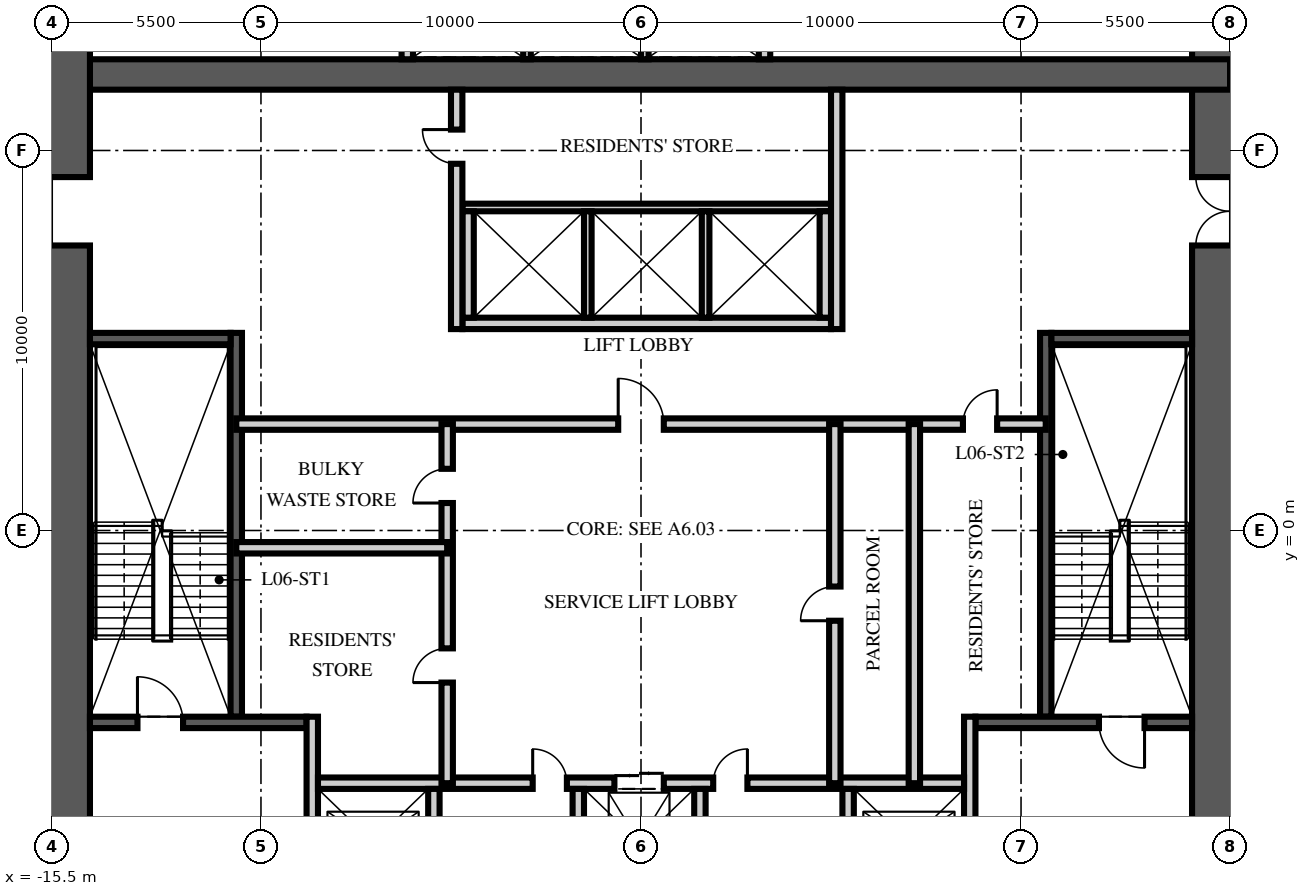
"""IFC4 building model, lengths in metres.
Left out: names, types, materials, properties, quantities, classifications, styles, units other than length and angle.
Written with IfcOpenShell. Run it as: python <this file> out.ifc"""

import sys

from ifc_helpers import new_model, si_unit, direction, frame, frame_2d, origin, place, context, subcontext, project, spatial, rectangle, extrude, element, fill, save


model = new_model("IFC4")
c1 = context("Model", 3, precision=1e-05, world=origin(), true_north=direction((0.0, 1.0)))
c2 = subcontext(c1, "Body", "Model", "MODEL_VIEW")
j1 = project(units=[si_unit("LENGTHUNIT", "METRE"), si_unit("PLANEANGLEUNIT", "RADIAN")], contexts=[c1])
p1 = place(None, origin())
s1 = spatial("IfcSite", under=j1, at=p1, CompositionType="ELEMENT")
p2 = place(p1, origin())
s2 = spatial("IfcBuilding", under=s1, at=p2, CompositionType="ELEMENT")
p3 = place(p2, frame((0.0, 0.0, 28.5)))
s3 = spatial("IfcBuildingStorey", under=s2, at=p3, CompositionType="ELEMENT", Elevation=28.5)
p4 = place(p3, frame((15.5, -15.5, -0.25), z_axis=(0.0, 0.0, 1.0), x_axis=(0.0, 1.0, 0.0)))
e1 = element("IfcWall", 1, at=p4, inside=s3, PredefinedType="SHEAR", context=c2, shape_type="SweptSolid", body=[
    extrude(rectangle(XDim=31.0, YDim=2.0, at=frame_2d((15.5, 0.0))), origin(), (0.0, 0.0, 1.0), 3.75),
])
p5 = place(p4, frame((6.5, 0.0, 0.25)))
e2 = element("IfcOpeningElement", 2, at=p5, cuts=e1, PredefinedType="OPENING", context=c2, shape_type="SweptSolid", body=[
    extrude(rectangle(XDim=1.2, YDim=2.1, at=frame_2d((0.6, 1.05))), frame((0.0, 1.01, 0.0), z_axis=(0.0, -1.0, 0.0), x_axis=(1.0, 0.0, 0.0)), (0.0, 0.0, 1.0), 2.02),
])
p6 = place(p4, frame((23.0, 0.0, 0.25)))
e3 = element("IfcOpeningElement", 3, at=p6, cuts=e1, PredefinedType="OPENING", context=c2, shape_type="SweptSolid", body=[
    extrude(rectangle(XDim=1.8, YDim=2.1, at=frame_2d((0.9, 1.05))), frame((0.0, 1.01, 0.0), z_axis=(0.0, -1.0, 0.0), x_axis=(1.0, 0.0, 0.0)), (0.0, 0.0, 1.0), 2.02),
])
p7 = place(p3, frame((-15.5, 12.0, -0.25), z_axis=(0.0, 0.0, 1.0), x_axis=(1.0, 0.0, 0.0)))
e4 = element("IfcWall", 4, at=p7, inside=s3, PredefinedType="SHEAR", context=c2, shape_type="SweptSolid", body=[
    extrude(rectangle(XDim=31.0, YDim=0.8, at=frame_2d((15.5, 0.0))), origin(), (0.0, 0.0, 1.0), 3.75),
])
p8 = place(p3, frame((-15.5, -15.5, -0.25), z_axis=(0.0, 0.0, 1.0), x_axis=(0.0, 1.0, 0.0)))
e5 = element("IfcWall", 5, at=p8, inside=s3, PredefinedType="SHEAR", context=c2, shape_type="SweptSolid", body=[
    extrude(rectangle(XDim=31.0, YDim=2.0, at=frame_2d((15.5, 0.0))), origin(), (0.0, 0.0, 1.0), 3.75),
])
p9 = place(p8, frame((6.5, 0.0, 0.25)))
e6 = element("IfcOpeningElement", 6, at=p9, cuts=e5, PredefinedType="OPENING", context=c2, shape_type="SweptSolid", body=[
    extrude(rectangle(XDim=1.2, YDim=2.1, at=frame_2d((0.6, 1.05))), frame((0.0, 1.01, 0.0), z_axis=(0.0, -1.0, 0.0), x_axis=(1.0, 0.0, 0.0)), (0.0, 0.0, 1.0), 2.02),
])
p10 = place(p8, frame((23.0, 0.0, 0.25)))
e7 = element("IfcOpeningElement", 7, at=p10, cuts=e5, PredefinedType="OPENING", context=c2, shape_type="SweptSolid", body=[
    extrude(rectangle(XDim=1.8, YDim=2.1, at=frame_2d((0.9, 1.05))), frame((0.0, 1.01, 0.0), z_axis=(0.0, -1.0, 0.0), x_axis=(1.0, 0.0, 0.0)), (0.0, 0.0, 1.0), 2.02),
])
p11 = place(p3, frame((-10.65, -4.9, 0.0), z_axis=(0.0, 0.0, 1.0), x_axis=(0.0, 1.0, 0.0)))
e8 = element("IfcWall", 8, at=p11, inside=s3, PredefinedType="SOLIDWALL", context=c2, shape_type="SweptSolid", body=[
    extrude(rectangle(XDim=10.1, YDim=0.3, at=frame_2d((5.05, 0.0))), origin(), (0.0, 0.0, 1.0), 3.5),
])
p12 = place(p3, frame((-14.5, -5.05, 0.0), z_axis=(0.0, 0.0, 1.0), x_axis=(1.0, 0.0, 0.0)))
e9 = element("IfcWall", 9, at=p12, inside=s3, PredefinedType="SOLIDWALL", context=c2, shape_type="SweptSolid", body=[
    extrude(rectangle(XDim=5.7, YDim=0.3, at=frame_2d((2.85, 0.0))), origin(), (0.0, 0.0, 1.0), 3.5),
])
p13 = place(p12, frame((1.25, 0.0, 0.0)))
e10 = element("IfcOpeningElement", 10, at=p13, cuts=e9, PredefinedType="OPENING", context=c2, shape_type="SweptSolid", body=[
    extrude(rectangle(XDim=1.2, YDim=2.1, at=frame_2d((0.6, 1.05))), frame((0.0, 0.16, 0.0), z_axis=(0.0, -1.0, 0.0), x_axis=(1.0, 0.0, 0.0)), (0.0, 0.0, 1.0), 0.32),
])
p14 = place(p3, frame((-14.5, 5.05, 0.0), z_axis=(0.0, 0.0, 1.0), x_axis=(1.0, 0.0, 0.0)))
e11 = element("IfcWall", 11, at=p14, inside=s3, PredefinedType="SOLIDWALL", context=c2, shape_type="SweptSolid", body=[
    extrude(rectangle(XDim=3.7, YDim=0.3, at=frame_2d((1.85, 0.0))), origin(), (0.0, 0.0, 1.0), 3.5),
])
p15 = place(p3, frame((-8.65, -11.6, 0.0), z_axis=(0.0, 0.0, 1.0), x_axis=(0.0, 1.0, 0.0)))
e12 = element("IfcWall", 12, at=p15, inside=s3, PredefinedType="PARTITIONING", context=c2, shape_type="SweptSolid", body=[
    extrude(rectangle(XDim=6.7, YDim=0.3, at=frame_2d((3.35, 0.0))), origin(), (0.0, 0.0, 1.0), 3.5),
])
p16 = place(p15, frame((2.85, 0.0, 0.0)))
e13 = element("IfcOpeningElement", 13, at=p16, cuts=e12, PredefinedType="OPENING", context=c2, shape_type="SweptSolid", body=[
    extrude(rectangle(XDim=1.1, YDim=2.1, at=frame_2d((0.55, 1.05))), frame((0.0, 0.16, 0.0), z_axis=(0.0, -1.0, 0.0), x_axis=(1.0, 0.0, 0.0)), (0.0, 0.0, 1.0), 0.32),
])
p17 = place(p3, frame((10.65, -4.9, 0.0), z_axis=(0.0, 0.0, 1.0), x_axis=(0.0, 1.0, 0.0)))
e14 = element("IfcWall", 14, at=p17, inside=s3, PredefinedType="SOLIDWALL", context=c2, shape_type="SweptSolid", body=[
    extrude(rectangle(XDim=10.1, YDim=0.3, at=frame_2d((5.05, 0.0))), origin(), (0.0, 0.0, 1.0), 3.5),
])
p18 = place(p3, frame((14.5, -5.05, 0.0), z_axis=(0.0, 0.0, 1.0), x_axis=(-1.0, 0.0, 0.0)))
e15 = element("IfcWall", 15, at=p18, inside=s3, PredefinedType="SOLIDWALL", context=c2, shape_type="SweptSolid", body=[
    extrude(rectangle(XDim=5.7, YDim=0.3, at=frame_2d((2.85, 0.0))), origin(), (0.0, 0.0, 1.0), 3.5),
])
p19 = place(p18, frame((1.25, 0.0, 0.0)))
e16 = element("IfcOpeningElement", 16, at=p19, cuts=e15, PredefinedType="OPENING", context=c2, shape_type="SweptSolid", body=[
    extrude(rectangle(XDim=1.2, YDim=2.1, at=frame_2d((0.6, 1.05))), frame((0.0, 0.16, 0.0), z_axis=(0.0, -1.0, 0.0), x_axis=(1.0, 0.0, 0.0)), (0.0, 0.0, 1.0), 0.32),
])
p20 = place(p3, frame((14.5, 5.05, 0.0), z_axis=(0.0, 0.0, 1.0), x_axis=(-1.0, 0.0, 0.0)))
e17 = element("IfcWall", 17, at=p20, inside=s3, PredefinedType="SOLIDWALL", context=c2, shape_type="SweptSolid", body=[
    extrude(rectangle(XDim=3.7, YDim=0.3, at=frame_2d((1.85, 0.0))), origin(), (0.0, 0.0, 1.0), 3.5),
])
p21 = place(p3, frame((8.65, -11.6, 0.0), z_axis=(0.0, 0.0, 1.0), x_axis=(0.0, 1.0, 0.0)))
e18 = element("IfcWall", 18, at=p21, inside=s3, PredefinedType="PARTITIONING", context=c2, shape_type="SweptSolid", body=[
    extrude(rectangle(XDim=6.7, YDim=0.3, at=frame_2d((3.35, 0.0))), origin(), (0.0, 0.0, 1.0), 3.5),
])
p22 = place(p21, frame((2.85, 0.0, 0.0)))
e19 = element("IfcOpeningElement", 19, at=p22, cuts=e18, PredefinedType="OPENING", context=c2, shape_type="SweptSolid", body=[
    extrude(rectangle(XDim=1.1, YDim=2.1, at=frame_2d((0.55, 1.05))), frame((0.0, 0.16, 0.0), z_axis=(0.0, -1.0, 0.0), x_axis=(1.0, 0.0, 0.0)), (0.0, 0.0, 1.0), 0.32),
])
p23 = place(p3, frame((-8.5, -6.65, 0.0), z_axis=(0.0, 0.0, 1.0), x_axis=(1.0, 0.0, 0.0)))
e20 = element("IfcWall", 20, at=p23, inside=s3, PredefinedType="PARTITIONING", context=c2, shape_type="SweptSolid", body=[
    extrude(rectangle(XDim=17.0, YDim=0.3, at=frame_2d((8.5, 0.0))), origin(), (0.0, 0.0, 1.0), 3.5),
])
p24 = place(p23, frame((7.8, 0.0, 0.0)))
e21 = element("IfcOpeningElement", 21, at=p24, cuts=e20, PredefinedType="OPENING", context=c2, shape_type="SweptSolid", body=[
    extrude(rectangle(XDim=1.3, YDim=2.4, at=frame_2d((0.65, 1.2))), frame((0.0, 0.16, 0.0), z_axis=(0.0, -1.0, 0.0), x_axis=(1.0, 0.0, 0.0)), (0.0, 0.0, 1.0), 0.32),
])
p25 = place(p23, frame((5.65, 0.0, 0.0)))
e22 = element("IfcOpeningElement", 22, at=p25, cuts=e20, PredefinedType="OPENING", context=c2, shape_type="SweptSolid", body=[
    extrude(rectangle(XDim=0.9, YDim=2.1, at=frame_2d((0.45, 1.05))), frame((0.0, 0.16, 0.0), z_axis=(0.0, -1.0, 0.0), x_axis=(1.0, 0.0, 0.0)), (0.0, 0.0, 1.0), 0.32),
])
p26 = place(p23, frame((10.4, 0.0, 0.0)))
e23 = element("IfcOpeningElement", 23, at=p26, cuts=e20, PredefinedType="OPENING", context=c2, shape_type="SweptSolid", body=[
    extrude(rectangle(XDim=0.9, YDim=2.1, at=frame_2d((0.45, 1.05))), frame((0.0, 0.16, 0.0), z_axis=(0.0, -1.0, 0.0), x_axis=(1.0, 0.0, 0.0)), (0.0, 0.0, 1.0), 0.32),
])
for number, where, z_axis, x_axis in (
    (24, (-5.45, -11.6, 0.0), (0.0, 0.0, 1.0), (0.0, 1.0, 0.0)),
    (25, (-1.65, -11.6, 0.0), (0.0, 0.0, 1.0), (0.0, 1.0, 0.0)),
    (26, (1.55, -11.6, 0.0), (0.0, 0.0, 1.0), (0.0, 1.0, 0.0)),
    (27, (5.45, -11.6, 0.0), (0.0, 0.0, 1.0), (0.0, 1.0, 0.0)),
):
    element("IfcWall", number, at=place(p3, frame(where, z_axis=z_axis, x_axis=x_axis)), inside=s3, PredefinedType="PARTITIONING", context=c2, shape_type="SweptSolid", body=[
        extrude(rectangle(XDim=4.8, YDim=0.3, at=frame_2d((2.4, 0.0))), origin(), (0.0, 0.0, 1.0), 3.5),
    ])
p27 = place(p3, frame((-4.7, 5.45, 0.0), z_axis=(0.0, 0.0, 1.0), x_axis=(1.0, 0.0, 0.0)))
e28 = element("IfcWall", 28, at=p27, inside=s3, PredefinedType="PARTITIONING", context=c2, shape_type="SweptSolid", body=[
    extrude(rectangle(XDim=9.7, YDim=0.3, at=frame_2d((4.85, 0.0))), origin(), (0.0, 0.0, 1.0), 3.5),
])
p28 = place(p3, frame((-4.7, 8.5, 0.0), z_axis=(0.0, 0.0, 1.0), x_axis=(1.0, 0.0, 0.0)))
e29 = element("IfcWall", 29, at=p28, inside=s3, PredefinedType="PARTITIONING", context=c2, shape_type="SweptSolid", body=[
    extrude(rectangle(XDim=9.7, YDim=0.2, at=frame_2d((4.85, 0.0))), origin(), (0.0, 0.0, 1.0), 3.5),
])
for number, where, z_axis, x_axis in (
    (30, (-4.55, 5.6, 0.0), (0.0, 0.0, 1.0), (0.0, 1.0, 0.0)),
    (31, (4.85, 5.6, 0.0), (0.0, 0.0, 1.0), (0.0, 1.0, 0.0)),
):
    element("IfcWall", number, at=place(p3, frame(where, z_axis=z_axis, x_axis=x_axis)), inside=s3, PredefinedType="PARTITIONING", context=c2, shape_type="SweptSolid", body=[
        extrude(rectangle(XDim=2.8, YDim=0.3, at=frame_2d((1.4, 0.0))), origin(), (0.0, 0.0, 1.0), 3.5),
    ])
for number, where, z_axis, x_axis in (
    (32, (-1.4, 5.6, 0.0), (0.0, 0.0, 1.0), (0.0, 1.0, 0.0)),
    (33, (1.7, 5.6, 0.0), (0.0, 0.0, 1.0), (0.0, 1.0, 0.0)),
):
    element("IfcWall", number, at=place(p3, frame(where, z_axis=z_axis, x_axis=x_axis)), inside=s3, PredefinedType="PARTITIONING", context=c2, shape_type="SweptSolid", body=[
        extrude(rectangle(XDim=2.8, YDim=0.2, at=frame_2d((1.4, 0.0))), origin(), (0.0, 0.0, 1.0), 3.5),
    ])
for number, where, z_axis, x_axis in (
    (34, (-6.15, 12.4, 0.0), (0.0, 0.0, 1.0), (0.0, 1.0, 0.0)),
    (35, (3.25, 12.4, 0.0), (0.0, 0.0, 1.0), (0.0, 1.0, 0.0)),
):
    element("IfcWall", number, at=place(p3, frame(where, z_axis=z_axis, x_axis=x_axis)), inside=s3, PredefinedType="PARTITIONING", context=c2, shape_type="SweptSolid", body=[
        extrude(rectangle(XDim=2.1, YDim=0.3, at=frame_2d((1.05, 0.0))), origin(), (0.0, 0.0, 1.0), 3.5),
    ])
for number, where, z_axis, x_axis in (
    (36, (-3.0, 12.4, 0.0), (0.0, 0.0, 1.0), (0.0, 1.0, 0.0)),
    (37, (0.1, 12.4, 0.0), (0.0, 0.0, 1.0), (0.0, 1.0, 0.0)),
):
    element("IfcWall", number, at=place(p3, frame(where, z_axis=z_axis, x_axis=x_axis)), inside=s3, PredefinedType="PARTITIONING", context=c2, shape_type="SweptSolid", body=[
        extrude(rectangle(XDim=2.1, YDim=0.2, at=frame_2d((1.05, 0.0))), origin(), (0.0, 0.0, 1.0), 3.5),
    ])
p29 = place(p3, frame((-10.65, 2.8, 0.0), z_axis=(0.0, 0.0, 1.0), x_axis=(1.0, 0.0, 0.0)))
e38 = element("IfcWall", 38, at=p29, inside=s3, PredefinedType="PARTITIONING", context=c2, shape_type="SweptSolid", body=[
    extrude(rectangle(XDim=21.3, YDim=0.3, at=frame_2d((10.65, 0.0))), origin(), (0.0, 0.0, 1.0), 3.5),
])
p30 = place(p29, frame((10.05, 0.0, 0.0)))
e39 = element("IfcOpeningElement", 39, at=p30, cuts=e38, PredefinedType="OPENING", context=c2, shape_type="SweptSolid", body=[
    extrude(rectangle(XDim=1.2, YDim=2.1, at=frame_2d((0.6, 1.05))), frame((0.0, 0.16, 0.0), z_axis=(0.0, -1.0, 0.0), x_axis=(1.0, 0.0, 0.0)), (0.0, 0.0, 1.0), 0.32),
])
p31 = place(p29, frame((19.121, 0.0, 0.0)))
e40 = element("IfcOpeningElement", 40, at=p31, cuts=e38, PredefinedType="OPENING", context=c2, shape_type="SweptSolid", body=[
    extrude(rectangle(XDim=0.9, YDim=2.1, at=frame_2d((0.45, 1.05))), frame((0.0, 0.16, 0.0), z_axis=(0.0, -1.0, 0.0), x_axis=(1.0, 0.0, 0.0)), (0.0, 0.0, 1.0), 0.32),
])
p32 = place(p3, frame((-5.1, -6.65, 0.0), z_axis=(0.0, 0.0, 1.0), x_axis=(0.0, 1.0, 0.0)))
e41 = element("IfcWall", 41, at=p32, inside=s3, PredefinedType="PARTITIONING", context=c2, shape_type="SweptSolid", body=[
    extrude(rectangle(XDim=9.45, YDim=0.3, at=frame_2d((4.725, 0.0))), origin(), (0.0, 0.0, 1.0), 3.5),
])
p33 = place(p32, frame((2.648, 0.0, 0.0)))
e42 = element("IfcOpeningElement", 42, at=p33, cuts=e41, PredefinedType="OPENING", context=c2, shape_type="SweptSolid", body=[
    extrude(rectangle(XDim=0.9, YDim=2.1, at=frame_2d((0.45, 1.05))), frame((0.0, 0.16, 0.0), z_axis=(0.0, -1.0, 0.0), x_axis=(1.0, 0.0, 0.0)), (0.0, 0.0, 1.0), 0.32),
])
p34 = place(p32, frame((7.373, 0.0, 0.0)))
e43 = element("IfcOpeningElement", 43, at=p34, cuts=e41, PredefinedType="OPENING", context=c2, shape_type="SweptSolid", body=[
    extrude(rectangle(XDim=0.9, YDim=2.1, at=frame_2d((0.45, 1.05))), frame((0.0, 0.16, 0.0), z_axis=(0.0, -1.0, 0.0), x_axis=(1.0, 0.0, 0.0)), (0.0, 0.0, 1.0), 0.32),
])
p35 = place(p3, frame((5.1, -6.65, 0.0), z_axis=(0.0, 0.0, 1.0), x_axis=(0.0, 1.0, 0.0)))
e44 = element("IfcWall", 44, at=p35, inside=s3, PredefinedType="PARTITIONING", context=c2, shape_type="SweptSolid", body=[
    extrude(rectangle(XDim=9.45, YDim=0.3, at=frame_2d((4.725, 0.0))), origin(), (0.0, 0.0, 1.0), 3.5),
])
p36 = place(p35, frame((4.275, 0.0, 0.0)))
e45 = element("IfcOpeningElement", 45, at=p36, cuts=e44, PredefinedType="OPENING", context=c2, shape_type="SweptSolid", body=[
    extrude(rectangle(XDim=0.9, YDim=2.1, at=frame_2d((0.45, 1.05))), frame((0.0, 0.16, 0.0), z_axis=(0.0, -1.0, 0.0), x_axis=(1.0, 0.0, 0.0)), (0.0, 0.0, 1.0), 0.32),
])
p37 = place(p3, frame((-10.65, -0.455, 0.0), z_axis=(0.0, 0.0, 1.0), x_axis=(1.0, 0.0, 0.0)))
e46 = element("IfcWall", 46, at=p37, inside=s3, PredefinedType="PARTITIONING", context=c2, shape_type="SweptSolid", body=[
    extrude(rectangle(XDim=5.55, YDim=0.3, at=frame_2d((2.775, 0.0))), origin(), (0.0, 0.0, 1.0), 3.5),
])
p38 = place(p3, frame((7.193, -6.65, 0.0), z_axis=(0.0, 0.0, 1.0), x_axis=(0.0, 1.0, 0.0)))
e47 = element("IfcWall", 47, at=p38, inside=s3, PredefinedType="PARTITIONING", context=c2, shape_type="SweptSolid", body=[
    extrude(rectangle(XDim=9.45, YDim=0.3, at=frame_2d((4.725, 0.0))), origin(), (0.0, 0.0, 1.0), 3.5),
])
p39 = place(p3, frame((-4.85, 5.3, 0.0), z_axis=(0.0, 0.0, 1.0), x_axis=(0.0, 1.0, 0.0)))
e48 = element("IfcWall", 48, at=p39, inside=s3, PredefinedType="PARTITIONING", context=c2, shape_type="SweptSolid", body=[
    extrude(rectangle(XDim=6.3, YDim=0.3, at=frame_2d((3.15, 0.0))), origin(), (0.0, 0.0, 1.0), 3.5),
])
p40 = place(p39, frame((4.35, 0.0, 0.0)))
e49 = element("IfcOpeningElement", 49, at=p40, cuts=e48, PredefinedType="OPENING", context=c2, shape_type="SweptSolid", body=[
    extrude(rectangle(XDim=0.9, YDim=2.1, at=frame_2d((0.45, 1.05))), frame((0.0, 0.16, 0.0), z_axis=(0.0, -1.0, 0.0), x_axis=(1.0, 0.0, 0.0)), (0.0, 0.0, 1.0), 0.32),
])
p41 = place(p3, frame((5.15, 5.3, 0.0), z_axis=(0.0, 0.0, 1.0), x_axis=(0.0, 1.0, 0.0)))
e50 = element("IfcWall", 50, at=p41, inside=s3, PredefinedType="PARTITIONING", context=c2, shape_type="SweptSolid", body=[
    extrude(rectangle(XDim=6.3, YDim=0.3, at=frame_2d((3.15, 0.0))), origin(), (0.0, 0.0, 1.0), 3.5),
])
p42 = place(p13, origin())
e51 = element("IfcDoor", 51, at=p42, inside=s3, OperationType="SINGLE_SWING_LEFT", PredefinedType="DOOR", context=c2, shape_type="SweptSolid", body=[
    extrude(rectangle(XDim=1.2, YDim=2.1, at=frame_2d((0.6, 1.05))), frame((0.0, 0.025, 0.0), z_axis=(0.0, -1.0, 0.0), x_axis=(1.0, 0.0, 0.0)), (0.0, 0.0, 1.0), 0.05),
])
fill(e10, e51)
p43 = place(p10, origin())
e52 = element("IfcDoor", 52, at=p43, inside=s3, OperationType="DOUBLE_DOOR_SINGLE_SWING", PredefinedType="DOOR", context=c2, shape_type="SweptSolid", body=[
    extrude(rectangle(XDim=1.8, YDim=2.1, at=frame_2d((0.9, 1.05))), frame((0.0, 0.025, 0.0), z_axis=(0.0, -1.0, 0.0), x_axis=(1.0, 0.0, 0.0)), (0.0, 0.0, 1.0), 0.05),
])
fill(e7, e52)
p44 = place(p19, origin())
e53 = element("IfcDoor", 53, at=p44, inside=s3, OperationType="SINGLE_SWING_LEFT", PredefinedType="DOOR", context=c2, shape_type="SweptSolid", body=[
    extrude(rectangle(XDim=1.2, YDim=2.1, at=frame_2d((0.6, 1.05))), frame((0.0, 0.025, 0.0), z_axis=(0.0, -1.0, 0.0), x_axis=(1.0, 0.0, 0.0)), (0.0, 0.0, 1.0), 0.05),
])
fill(e16, e53)
p45 = place(p6, origin())
e54 = element("IfcDoor", 54, at=p45, inside=s3, OperationType="DOUBLE_DOOR_SINGLE_SWING", PredefinedType="DOOR", context=c2, shape_type="SweptSolid", body=[
    extrude(rectangle(XDim=1.8, YDim=2.1, at=frame_2d((0.9, 1.05))), frame((0.0, 0.025, 0.0), z_axis=(0.0, -1.0, 0.0), x_axis=(1.0, 0.0, 0.0)), (0.0, 0.0, 1.0), 0.05),
])
fill(e3, e54)
p46 = place(p24, origin())
e55 = element("IfcDoor", 55, at=p46, inside=s3, OperationType="DOUBLE_DOOR_SLIDING", PredefinedType="DOOR", context=c2, shape_type="SweptSolid", body=[
    extrude(rectangle(XDim=1.3, YDim=2.4, at=frame_2d((0.65, 1.2))), frame((0.0, 0.025, 0.0), z_axis=(0.0, -1.0, 0.0), x_axis=(1.0, 0.0, 0.0)), (0.0, 0.0, 1.0), 0.05),
])
fill(e21, e55)
p47 = place(p30, origin())
e56 = element("IfcDoor", 56, at=p47, inside=s3, OperationType="SINGLE_SWING_LEFT", PredefinedType="DOOR", context=c2, shape_type="SweptSolid", body=[
    extrude(rectangle(XDim=1.2, YDim=2.1, at=frame_2d((0.6, 1.05))), frame((0.0, 0.025, 0.0), z_axis=(0.0, -1.0, 0.0), x_axis=(1.0, 0.0, 0.0)), (0.0, 0.0, 1.0), 0.05),
])
fill(e39, e56)
p48 = place(p25, origin())
e57 = element("IfcDoor", 57, at=p48, inside=s3, OperationType="SINGLE_SWING_LEFT", PredefinedType="DOOR", context=c2, shape_type="SweptSolid", body=[
    extrude(rectangle(XDim=0.9, YDim=2.1, at=frame_2d((0.45, 1.05))), frame((0.0, 0.025, 0.0), z_axis=(0.0, -1.0, 0.0), x_axis=(1.0, 0.0, 0.0)), (0.0, 0.0, 1.0), 0.05),
])
fill(e22, e57)
p49 = place(p26, origin())
e58 = element("IfcDoor", 58, at=p49, inside=s3, OperationType="SINGLE_SWING_RIGHT", PredefinedType="DOOR", context=c2, shape_type="SweptSolid", body=[
    extrude(rectangle(XDim=0.9, YDim=2.1, at=frame_2d((0.45, 1.05))), frame((0.0, 0.025, 0.0), z_axis=(0.0, -1.0, 0.0), x_axis=(1.0, 0.0, 0.0)), (0.0, 0.0, 1.0), 0.05),
])
fill(e23, e58)
p50 = place(p33, origin())
e59 = element("IfcDoor", 59, at=p50, inside=s3, OperationType="SINGLE_SWING_LEFT", PredefinedType="DOOR", context=c2, shape_type="SweptSolid", body=[
    extrude(rectangle(XDim=0.9, YDim=2.1, at=frame_2d((0.45, 1.05))), frame((0.0, 0.025, 0.0), z_axis=(0.0, -1.0, 0.0), x_axis=(1.0, 0.0, 0.0)), (0.0, 0.0, 1.0), 0.05),
])
fill(e42, e59)
p51 = place(p34, origin())
e60 = element("IfcDoor", 60, at=p51, inside=s3, OperationType="SINGLE_SWING_LEFT", PredefinedType="DOOR", context=c2, shape_type="SweptSolid", body=[
    extrude(rectangle(XDim=0.9, YDim=2.1, at=frame_2d((0.45, 1.05))), frame((0.0, 0.025, 0.0), z_axis=(0.0, -1.0, 0.0), x_axis=(1.0, 0.0, 0.0)), (0.0, 0.0, 1.0), 0.05),
])
fill(e43, e60)
p52 = place(p36, origin())
e61 = element("IfcDoor", 61, at=p52, inside=s3, OperationType="SINGLE_SWING_LEFT", PredefinedType="DOOR", context=c2, shape_type="SweptSolid", body=[
    extrude(rectangle(XDim=0.9, YDim=2.1, at=frame_2d((0.45, 1.05))), frame((0.0, 0.025, 0.0), z_axis=(0.0, -1.0, 0.0), x_axis=(1.0, 0.0, 0.0)), (0.0, 0.0, 1.0), 0.05),
])
fill(e45, e61)
p53 = place(p31, origin())
e62 = element("IfcDoor", 62, at=p53, inside=s3, OperationType="SINGLE_SWING_RIGHT", PredefinedType="DOOR", context=c2, shape_type="SweptSolid", body=[
    extrude(rectangle(XDim=0.9, YDim=2.1, at=frame_2d((0.45, 1.05))), frame((0.0, 0.025, 0.0), z_axis=(0.0, -1.0, 0.0), x_axis=(1.0, 0.0, 0.0)), (0.0, 0.0, 1.0), 0.05),
])
fill(e40, e62)
p54 = place(p40, origin())
e63 = element("IfcDoor", 63, at=p54, inside=s3, OperationType="SINGLE_SWING_RIGHT", PredefinedType="DOOR", context=c2, shape_type="SweptSolid", body=[
    extrude(rectangle(XDim=0.9, YDim=2.1, at=frame_2d((0.45, 1.05))), frame((0.0, 0.025, 0.0), z_axis=(0.0, -1.0, 0.0), x_axis=(1.0, 0.0, 0.0)), (0.0, 0.0, 1.0), 0.05),
])
fill(e49, e63)
save(model, sys.argv[1])
